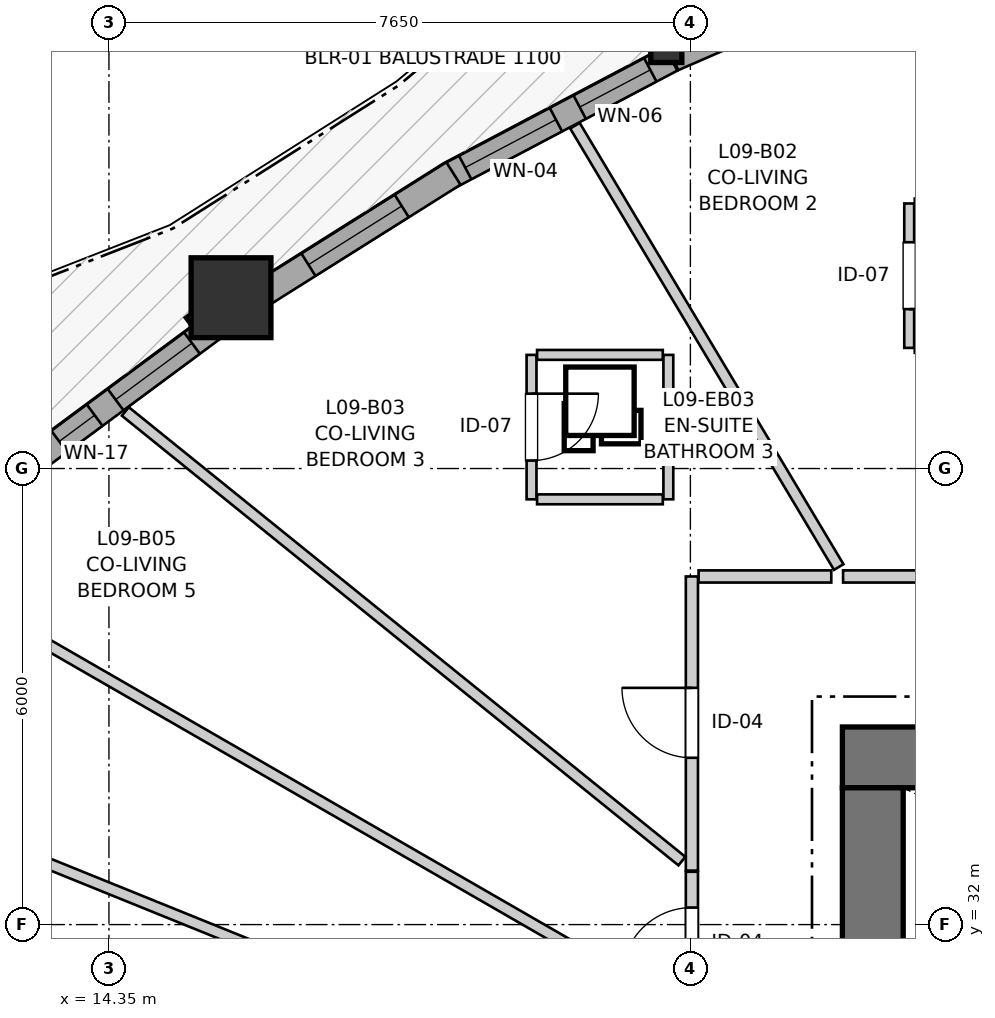
"""IFC4 building model, lengths in metres.
Left out: names, types, materials, properties, quantities, classifications, styles, units other than length and angle.
Written with IfcOpenShell. Run it as: python <this file> out.ifc"""

import sys

from ifc_helpers import new_model, si_unit, direction, frame, frame_2d, origin, origin_2d, place, context, subcontext, project, spatial, rectangle, i_section, extrude, source, transform, mapped, element, fill, save


model = new_model("IFC4")
c1 = context("Model", 3, precision=1e-05, world=origin(), true_north=direction((0.0, 1.0)))
c2 = subcontext(c1, "Body", "Model", "MODEL_VIEW")
j1 = project(units=[si_unit("LENGTHUNIT", "METRE"), si_unit("PLANEANGLEUNIT", "RADIAN")], contexts=[c1])
p1 = place(None, origin())
s1 = spatial("IfcSite", under=j1, at=p1, CompositionType="ELEMENT")
p2 = place(p1, origin())
s2 = spatial("IfcBuilding", under=s1, at=p2, CompositionType="ELEMENT")
p3 = place(p2, frame((0.0, 0.0, 33.4)))
s3 = spatial("IfcBuildingStorey", under=s2, at=p3, CompositionType="ELEMENT", Elevation=33.4)
p4 = place(p3, frame((36.7, 34.2, 0.0), z_axis=(0.0, 0.0, 1.0), x_axis=(-1.0, 0.0, 0.0)))
e1 = element("IfcWall", 1, at=p4, inside=s3, PredefinedType="SHEAR", context=c2, shape_type="SweptSolid", body=[
    extrude(rectangle(XDim=12.7, YDim=0.8, at=frame_2d((6.35, 0.0))), origin(), (0.0, 0.0, 1.0), 2.94),
])
p5 = place(p3, frame((24.4, 33.8, 0.0), z_axis=(0.0, 0.0, 1.0), x_axis=(0.0, -1.0, 0.0)))
e2 = element("IfcWall", 2, at=p5, inside=s3, PredefinedType="SHEAR", context=c2, shape_type="SweptSolid", body=[
    extrude(rectangle(XDim=15.6, YDim=0.8, at=frame_2d((7.8, 0.0))), origin(), (0.0, 0.0, 1.0), 2.94),
])
p6 = place(p5, frame((7.05, 0.0, 0.0)))
e3 = element("IfcOpeningElement", 3, at=p6, cuts=e2, PredefinedType="OPENING", context=c2, shape_type="SweptSolid", body=[
    extrude(rectangle(XDim=1.5, YDim=2.15, at=frame_2d((0.75, 1.075))), frame((0.0, 0.41, 0.0), z_axis=(0.0, -1.0, 0.0), x_axis=(1.0, 0.0, 0.0)), (0.0, 0.0, 1.0), 0.82),
])
p7 = place(p5, frame((3.52, 0.0, 0.0)))
e4 = element("IfcOpeningElement", 4, at=p7, cuts=e2, PredefinedType="OPENING", context=c2, shape_type="SweptSolid", body=[
    extrude(rectangle(XDim=0.86, YDim=2.05, at=frame_2d((0.43, 1.025))), frame((0.0, 0.41, 0.0), z_axis=(0.0, -1.0, 0.0), x_axis=(1.0, 0.0, 0.0)), (0.0, 0.0, 1.0), 0.82),
])
p8 = place(p5, frame((11.22, 0.0, 0.0)))
e5 = element("IfcOpeningElement", 5, at=p8, cuts=e2, PredefinedType="OPENING", context=c2, shape_type="SweptSolid", body=[
    extrude(rectangle(XDim=0.86, YDim=2.05, at=frame_2d((0.43, 1.025))), frame((0.0, 0.41, 0.0), z_axis=(0.0, -1.0, 0.0), x_axis=(1.0, 0.0, 0.0)), (0.0, 0.0, 1.0), 0.82),
])
m1 = source(origin(), c2, "Body", "SweptSolid", [
    extrude(i_section(OverallWidth=0.409, OverallDepth=0.425, WebThickness=0.03, FlangeThickness=0.048, FilletRadius=0.015, at=origin_2d()), origin(), (0.0, 0.0, 1.0), 2.94),
])
p9 = place(p3, frame((21.683, 43.554, 0.0), z_axis=(0.0, 0.0, 1.0), x_axis=(1.0, 0.0, 0.0)))
e6 = element("IfcColumn", 6, at=p9, inside=s3, PredefinedType="PILASTER", context=c2, shape_type="MappedRepresentation", body=[
    mapped(m1, transform((0.0, 0.0, 0.0), x_axis=(1.0, 0.0, 0.0), y_axis=(0.0, 1.0, 0.0), z_axis=(0.0, 0.0, 1.0), scale=1.0)),
])
m2 = source(origin(), c2, "Body", "SweptSolid", [
    extrude(rectangle(XDim=1.05, YDim=1.05, at=origin_2d()), origin(), (0.0, 0.0, 1.0), 2.94),
])
p10 = place(p3, frame((15.956, 40.247, 0.0), z_axis=(0.0, 0.0, 1.0), x_axis=(1.0, 0.0, 0.0)))
e7 = element("IfcColumn", 7, at=p10, inside=s3, PredefinedType="COLUMN", context=c2, shape_type="MappedRepresentation", body=[
    mapped(m2, transform((0.0, 0.0, 0.0), x_axis=(1.0, 0.0, 0.0), y_axis=(0.0, 1.0, 0.0), z_axis=(0.0, 0.0, 1.0), scale=1.0)),
])
p11 = place(p3, frame((24.84, 44.735, 0.0), z_axis=(0.0, 0.0, 1.0), x_axis=(-0.917090935142, -0.398678086532, 0.0)))
e8 = element("IfcWall", 8, at=p11, inside=s3, PredefinedType="SOLIDWALL", context=c2, shape_type="SweptSolid", body=[
    extrude(rectangle(XDim=3.346, YDim=0.35, at=frame_2d((1.673, 0.0))), origin(), (0.0, 0.0, 1.0), 2.42),
])
p12 = place(p11, frame((1.108, 0.0, 0.82)))
e9 = element("IfcOpeningElement", 9, at=p12, cuts=e8, PredefinedType="OPENING", context=c2, shape_type="SweptSolid", body=[
    extrude(rectangle(XDim=1.15, YDim=1.2, at=frame_2d((0.575, 0.6))), frame((0.0, 0.185, 0.0), z_axis=(0.0, -1.0, 0.0), x_axis=(1.0, 0.0, 0.0)), (0.0, 0.0, 1.0), 0.37),
])
p13 = place(p3, frame((21.747, 43.39, 0.0), z_axis=(0.0, 0.0, 1.0), x_axis=(-0.88437802144, -0.46677137358, 0.0)))
e10 = element("IfcWall", 10, at=p13, inside=s3, PredefinedType="SOLIDWALL", context=c2, shape_type="SweptSolid", body=[
    extrude(rectangle(XDim=3.327, YDim=0.35, at=frame_2d((1.664, 0.0))), origin(), (0.0, 0.0, 1.0), 2.42),
])
p14 = place(p13, frame((0.311, 0.0, 0.82)))
e11 = element("IfcOpeningElement", 11, at=p14, cuts=e10, PredefinedType="OPENING", context=c2, shape_type="SweptSolid", body=[
    extrude(rectangle(XDim=1.05, YDim=1.45, at=frame_2d((0.525, 0.725))), frame((0.0, 0.185, 0.0), z_axis=(0.0, -1.0, 0.0), x_axis=(1.0, 0.0, 0.0)), (0.0, 0.0, 1.0), 0.37),
])
p15 = place(p13, frame((1.714, 0.0, 0.82)))
e12 = element("IfcOpeningElement", 12, at=p15, cuts=e10, PredefinedType="OPENING", context=c2, shape_type="SweptSolid", body=[
    extrude(rectangle(XDim=1.35, YDim=1.45, at=frame_2d((0.675, 0.725))), frame((0.0, 0.185, 0.0), z_axis=(0.0, -1.0, 0.0), x_axis=(1.0, 0.0, 0.0)), (0.0, 0.0, 1.0), 0.37),
])
p16 = place(p3, frame((18.882, 41.882, 0.0), z_axis=(0.0, 0.0, 1.0), x_axis=(-0.846428134238, -0.53250297048, 0.0)))
e13 = element("IfcWall", 13, at=p16, inside=s3, PredefinedType="SOLIDWALL", context=c2, shape_type="SweptSolid", body=[
    extrude(rectangle(XDim=3.047, YDim=0.35, at=frame_2d((1.523, 0.0))), origin(), (0.0, 0.0, 1.0), 2.42),
])
p17 = place(p16, frame((0.803, 0.0, 0.82)))
e14 = element("IfcOpeningElement", 14, at=p17, cuts=e13, PredefinedType="OPENING", context=c2, shape_type="SweptSolid", body=[
    extrude(rectangle(XDim=1.45, YDim=1.25, at=frame_2d((0.725, 0.625))), frame((0.0, 0.185, 0.0), z_axis=(0.0, -1.0, 0.0), x_axis=(1.0, 0.0, 0.0)), (0.0, 0.0, 1.0), 0.37),
])
p18 = place(p3, frame((15.819, 39.928, 0.0), z_axis=(0.0, 0.0, 1.0), x_axis=(-0.803825144674, -0.594865645999, 0.0)))
e15 = element("IfcWall", 15, at=p18, inside=s3, PredefinedType="SOLIDWALL", context=c2, shape_type="SweptSolid", body=[
    extrude(rectangle(XDim=3.066, YDim=0.35, at=frame_2d((1.533, 0.0))), origin(), (0.0, 0.0, 1.0), 2.42),
])
p19 = place(p18, frame((0.469, 0.0, 0.82)))
e16 = element("IfcOpeningElement", 16, at=p19, cuts=e15, PredefinedType="OPENING", context=c2, shape_type="SweptSolid", body=[
    extrude(rectangle(XDim=1.25, YDim=1.35, at=frame_2d((0.625, 0.675))), frame((0.0, 0.185, 0.0), z_axis=(0.0, -1.0, 0.0), x_axis=(1.0, 0.0, 0.0)), (0.0, 0.0, 1.0), 0.37),
])
p20 = place(p18, frame((2.062, 0.0, 0.82)))
e17 = element("IfcOpeningElement", 17, at=p20, cuts=e15, PredefinedType="OPENING", context=c2, shape_type="SweptSolid", body=[
    extrude(rectangle(XDim=0.58, YDim=1.35, at=frame_2d((0.29, 0.675))), frame((0.0, 0.185, 0.0), z_axis=(0.0, -1.0, 0.0), x_axis=(1.0, 0.0, 0.0)), (0.0, 0.0, 1.0), 0.37),
])
p21 = place(p3, frame((22.02, 32.71, 0.0), z_axis=(0.0, 0.0, 1.0), x_axis=(0.0, 1.0, 0.0)))
e18 = element("IfcWall", 18, at=p21, inside=s3, PredefinedType="PARTITIONING", context=c2, shape_type="SweptSolid", body=[
    extrude(rectangle(XDim=3.87, YDim=0.16, at=frame_2d((1.935, 0.0))), origin(), (0.0, 0.0, 1.0), 2.94),
])
p22 = place(p21, frame((1.485, 0.0, 0.0)))
e19 = element("IfcOpeningElement", 19, at=p22, cuts=e18, PredefinedType="OPENING", context=c2, shape_type="SweptSolid", body=[
    extrude(rectangle(XDim=0.92, YDim=2.1, at=frame_2d((0.46, 1.05))), frame((0.0, 0.09, 0.0), z_axis=(0.0, -1.0, 0.0), x_axis=(1.0, 0.0, 0.0)), (0.0, 0.0, 1.0), 0.18),
])
p23 = place(p3, frame((24.009, 36.58, 0.0), z_axis=(0.0, 0.0, 1.0), x_axis=(1.0, 0.0, 0.0)))
e20 = element("IfcWall", 20, at=p23, inside=s3, PredefinedType="PARTITIONING", context=c2, shape_type="SweptSolid", body=[
    extrude(rectangle(XDim=3.822, YDim=0.16, at=frame_2d((1.911, 0.0))), origin(), (0.0, 0.0, 1.0), 2.548),
])
p24 = place(p23, frame((1.452, 0.0, 0.0)))
e21 = element("IfcOpeningElement", 21, at=p24, cuts=e20, PredefinedType="OPENING", context=c2, shape_type="SweptSolid", body=[
    extrude(rectangle(XDim=0.92, YDim=2.1, at=frame_2d((0.46, 1.05))), frame((0.0, 0.09, 0.0), z_axis=(0.0, -1.0, 0.0), x_axis=(1.0, 0.0, 0.0)), (0.0, 0.0, 1.0), 0.18),
])
p25 = place(p3, frame((22.02, 30.782, 0.0), z_axis=(0.0, 0.0, 1.0), x_axis=(0.0, 1.0, 0.0)))
e22 = element("IfcWall", 22, at=p25, inside=s3, PredefinedType="PARTITIONING", context=c2, shape_type="SweptSolid", body=[
    extrude(rectangle(XDim=1.913, YDim=0.16, at=frame_2d((0.957, 0.0))), origin(), (0.0, 0.0, 1.0), 2.94),
])
p26 = place(p25, frame((0.522, 0.0, 0.0)))
e23 = element("IfcOpeningElement", 23, at=p26, cuts=e22, PredefinedType="OPENING", context=c2, shape_type="SweptSolid", body=[
    extrude(rectangle(XDim=0.92, YDim=2.1, at=frame_2d((0.46, 1.05))), frame((0.0, 0.09, 0.0), z_axis=(0.0, -1.0, 0.0), x_axis=(1.0, 0.0, 0.0)), (0.0, 0.0, 1.0), 0.18),
])
p27 = place(p3, frame((24.879, 41.487, 0.0), z_axis=(0.0, 0.0, 1.0), x_axis=(0.0, -1.0, 0.0)))
e24 = element("IfcWall", 24, at=p27, inside=s3, PredefinedType="PARTITIONING", context=c2, shape_type="SweptSolid", body=[
    extrude(rectangle(XDim=1.9, YDim=0.13, at=frame_2d((0.95, 0.0))), origin(), (0.0, 0.0, 1.0), 2.94),
])
p28 = place(p27, frame((0.51, 0.0, 0.0)))
e25 = element("IfcOpeningElement", 25, at=p28, cuts=e24, PredefinedType="OPENING", context=c2, shape_type="SweptSolid", body=[
    extrude(rectangle(XDim=0.88, YDim=2.05, at=frame_2d((0.44, 1.025))), frame((0.0, 0.075, 0.0), z_axis=(0.0, -1.0, 0.0), x_axis=(1.0, 0.0, 0.0)), (0.0, 0.0, 1.0), 0.15),
])
p29 = place(p3, frame((19.91, 39.495, 0.0), z_axis=(0.0, 0.0, 1.0), x_axis=(0.0, -1.0, 0.0)))
e26 = element("IfcWall", 26, at=p29, inside=s3, PredefinedType="PARTITIONING", context=c2, shape_type="SweptSolid", body=[
    extrude(rectangle(XDim=1.9, YDim=0.13, at=frame_2d((0.95, 0.0))), origin(), (0.0, 0.0, 1.0), 2.94),
])
p30 = place(p29, frame((0.51, 0.0, 0.0)))
e27 = element("IfcOpeningElement", 27, at=p30, cuts=e26, PredefinedType="OPENING", context=c2, shape_type="SweptSolid", body=[
    extrude(rectangle(XDim=0.88, YDim=2.05, at=frame_2d((0.44, 1.025))), frame((0.0, 0.075, 0.0), z_axis=(0.0, -1.0, 0.0), x_axis=(1.0, 0.0, 0.0)), (0.0, 0.0, 1.0), 0.15),
])
p31 = place(p3, frame((9.577, 34.41, 0.0), z_axis=(0.0, 0.0, 1.0), x_axis=(0.926920362809, -0.375258099194, 0.0)))
e28 = element("IfcWall", 28, at=p31, inside=s3, PredefinedType="PARTITIONING", context=c2, shape_type="SweptSolid", body=[
    extrude(rectangle(XDim=13.3, YDim=0.145, at=frame_2d((6.65, 0.0))), origin(), (0.0, 0.0, 1.0), 2.94),
])
p32 = place(p3, frame((11.92, 36.618, 0.0), z_axis=(0.0, 0.0, 1.0), x_axis=(0.866473494239, -0.499223080177, 0.0)))
e29 = element("IfcWall", 29, at=p32, inside=s3, PredefinedType="PARTITIONING", context=c2, shape_type="SweptSolid", body=[
    extrude(rectangle(XDim=11.514, YDim=0.145, at=frame_2d((5.757, 0.0))), origin(), (0.0, 0.0, 1.0), 2.94),
])
p33 = place(p3, frame((14.566, 38.751, 0.0), z_axis=(0.0, 0.0, 1.0), x_axis=(0.777881688073, -0.628410756879, 0.0)))
e30 = element("IfcWall", 30, at=p33, inside=s3, PredefinedType="PARTITIONING", context=c2, shape_type="SweptSolid", body=[
    extrude(rectangle(XDim=9.413, YDim=0.145, at=frame_2d((4.707, 0.0))), origin(), (0.0, 0.0, 1.0), 2.94),
])
p34 = place(p3, frame((20.481, 42.51, 0.0), z_axis=(0.0, 0.0, 1.0), x_axis=(0.513067331262, -0.858348363773, 0.0)))
e31 = element("IfcWall", 31, at=p34, inside=s3, PredefinedType="PARTITIONING", context=c2, shape_type="SweptSolid", body=[
    extrude(rectangle(XDim=6.765, YDim=0.145, at=frame_2d((3.382, 0.0))), origin(), (0.0, 0.0, 1.0), 2.94),
])
p35 = place(p3, frame((22.108, 36.58, 0.0), z_axis=(0.0, 0.0, 1.0), x_axis=(1.0, 0.0, 0.0)))
e32 = element("IfcWall", 32, at=p35, inside=s3, PredefinedType="PARTITIONING", context=c2, shape_type="SweptSolid", body=[
    extrude(rectangle(XDim=1.746, YDim=0.16, at=frame_2d((0.873, 0.0))), origin(), (0.0, 0.0, 1.0), 2.548),
])
p36 = place(p3, frame((21.71, 37.595, 0.0), z_axis=(0.0, 0.0, 1.0), x_axis=(0.0, 1.0, 0.0)))
e33 = element("IfcWall", 33, at=p36, inside=s3, PredefinedType="PARTITIONING", context=c2, shape_type="SweptSolid", body=[
    extrude(rectangle(XDim=1.9, YDim=0.13, at=frame_2d((0.95, 0.0))), origin(), (0.0, 0.0, 1.0), 2.94),
])
for number, where, z_axis, x_axis in (
    (34, (19.983, 39.495, 0.0), (0.0, 0.0, 1.0), (1.0, 0.0, 0.0)),
    (35, (19.983, 37.595, 0.0), (0.0, 0.0, 1.0), (1.0, 0.0, 0.0)),
):
    element("IfcWall", number, at=place(p3, frame(where, z_axis=z_axis, x_axis=x_axis)), inside=s3, PredefinedType="PARTITIONING", context=c2, shape_type="SweptSolid", body=[
        extrude(rectangle(XDim=1.654, YDim=0.13, at=frame_2d((0.827, 0.0))), origin(), (0.0, 0.0, 1.0), 2.94),
    ])
p37 = place(p3, frame((24.952, 39.587, 0.0), z_axis=(0.0, 0.0, 1.0), x_axis=(1.0, 0.0, 0.0)))
e36 = element("IfcWall", 36, at=p37, inside=s3, PredefinedType="PARTITIONING", context=c2, shape_type="SweptSolid", body=[
    extrude(rectangle(XDim=1.727, YDim=0.13, at=frame_2d((0.864, 0.0))), origin(), (0.0, 0.0, 1.0), 2.94),
])
p38 = place(p3, frame((24.952, 41.487, 0.0), z_axis=(0.0, 0.0, 1.0), x_axis=(1.0, 0.0, 0.0)))
e37 = element("IfcWall", 37, at=p38, inside=s3, PredefinedType="PARTITIONING", context=c2, shape_type="SweptSolid", body=[
    extrude(rectangle(XDim=1.59, YDim=0.13, at=frame_2d((0.795, 0.0))), origin(), (0.0, 0.0, 1.0), 2.508),
])
m3 = source(origin(), c2, "Body", "SweptSolid", [
    extrude(rectangle(XDim=1.05, YDim=1.45, at=frame_2d((0.525, 0.725))), frame((0.0, 0.03, 0.0), z_axis=(0.0, -1.0, 0.0), x_axis=(1.0, 0.0, 0.0)), (0.0, 0.0, 1.0), 0.06),
])
p39 = place(p14, origin())
e38 = element("IfcWindow", 38, at=p39, inside=s3, PartitioningType="SINGLE_PANEL", PredefinedType="WINDOW", context=c2, shape_type="MappedRepresentation", body=[
    mapped(m3, transform((0.0, 0.0, 0.0), x_axis=(1.0, 0.0, 0.0), y_axis=(0.0, 1.0, 0.0), z_axis=(0.0, 0.0, 1.0), scale=1.0)),
])
fill(e11, e38)
m4 = source(origin(), c2, "Body", "SweptSolid", [
    extrude(rectangle(XDim=1.35, YDim=1.45, at=frame_2d((0.675, 0.725))), frame((0.0, 0.03, 0.0), z_axis=(0.0, -1.0, 0.0), x_axis=(1.0, 0.0, 0.0)), (0.0, 0.0, 1.0), 0.06),
])
p40 = place(p15, origin())
e39 = element("IfcWindow", 39, at=p40, inside=s3, PartitioningType="SINGLE_PANEL", PredefinedType="WINDOW", context=c2, shape_type="MappedRepresentation", body=[
    mapped(m4, transform((0.0, 0.0, 0.0), x_axis=(1.0, 0.0, 0.0), y_axis=(0.0, 1.0, 0.0), z_axis=(0.0, 0.0, 1.0), scale=1.0)),
])
fill(e12, e39)
m5 = source(origin(), c2, "Body", "SweptSolid", [
    extrude(rectangle(XDim=1.45, YDim=1.25, at=frame_2d((0.725, 0.625))), frame((0.0, 0.03, 0.0), z_axis=(0.0, -1.0, 0.0), x_axis=(1.0, 0.0, 0.0)), (0.0, 0.0, 1.0), 0.06),
])
p41 = place(p17, origin())
e40 = element("IfcWindow", 40, at=p41, inside=s3, PartitioningType="SINGLE_PANEL", PredefinedType="WINDOW", context=c2, shape_type="MappedRepresentation", body=[
    mapped(m5, transform((0.0, 0.0, 0.0), x_axis=(1.0, 0.0, 0.0), y_axis=(0.0, 1.0, 0.0), z_axis=(0.0, 0.0, 1.0), scale=1.0)),
])
fill(e14, e40)
m6 = source(origin(), c2, "Body", "SweptSolid", [
    extrude(rectangle(XDim=1.25, YDim=1.35, at=frame_2d((0.625, 0.675))), frame((0.0, 0.03, 0.0), z_axis=(0.0, -1.0, 0.0), x_axis=(1.0, 0.0, 0.0)), (0.0, 0.0, 1.0), 0.06),
])
p42 = place(p19, origin())
e41 = element("IfcWindow", 41, at=p42, inside=s3, PartitioningType="SINGLE_PANEL", PredefinedType="WINDOW", context=c2, shape_type="MappedRepresentation", body=[
    mapped(m6, transform((0.0, 0.0, 0.0), x_axis=(1.0, 0.0, 0.0), y_axis=(0.0, 1.0, 0.0), z_axis=(0.0, 0.0, 1.0), scale=1.0)),
])
fill(e16, e41)
m7 = source(origin(), c2, "Body", "SweptSolid", [
    extrude(rectangle(XDim=0.58, YDim=1.35, at=frame_2d((0.29, 0.675))), frame((0.0, 0.03, 0.0), z_axis=(0.0, -1.0, 0.0), x_axis=(1.0, 0.0, 0.0)), (0.0, 0.0, 1.0), 0.06),
])
p43 = place(p20, origin())
e42 = element("IfcWindow", 42, at=p43, inside=s3, PartitioningType="SINGLE_PANEL", PredefinedType="WINDOW", context=c2, shape_type="MappedRepresentation", body=[
    mapped(m7, transform((0.0, 0.0, 0.0), x_axis=(1.0, 0.0, 0.0), y_axis=(0.0, 1.0, 0.0), z_axis=(0.0, 0.0, 1.0), scale=1.0)),
])
fill(e17, e42)
m8 = source(origin(), c2, "Body", "SweptSolid", [
    extrude(rectangle(XDim=0.92, YDim=2.1, at=frame_2d((0.46, 1.05))), frame((0.0, 0.025, 0.0), z_axis=(0.0, -1.0, 0.0), x_axis=(1.0, 0.0, 0.0)), (0.0, 0.0, 1.0), 0.05),
])
p44 = place(p22, origin())
e43 = element("IfcDoor", 43, at=p44, inside=s3, OperationType="SINGLE_SWING_RIGHT", PredefinedType="DOOR", context=c2, shape_type="MappedRepresentation", body=[
    mapped(m8, transform((0.0, 0.0, 0.0), x_axis=(1.0, 0.0, 0.0), y_axis=(0.0, 1.0, 0.0), z_axis=(0.0, 0.0, 1.0), scale=1.0)),
])
fill(e19, e43)
p45 = place(p26, origin())
e44 = element("IfcDoor", 44, at=p45, inside=s3, OperationType="SINGLE_SWING_LEFT", PredefinedType="DOOR", context=c2, shape_type="MappedRepresentation", body=[
    mapped(m8, transform((0.0, 0.0, 0.0), x_axis=(1.0, 0.0, 0.0), y_axis=(0.0, 1.0, 0.0), z_axis=(0.0, 0.0, 1.0), scale=1.0)),
])
fill(e23, e44)
m9 = source(origin(), c2, "Body", "SweptSolid", [
    extrude(rectangle(XDim=0.88, YDim=2.05, at=frame_2d((0.44, 1.025))), frame((0.0, 0.025, 0.0), z_axis=(0.0, -1.0, 0.0), x_axis=(1.0, 0.0, 0.0)), (0.0, 0.0, 1.0), 0.05),
])
p46 = place(p28, origin())
e45 = element("IfcDoor", 45, at=p46, inside=s3, OperationType="SINGLE_SWING_RIGHT", PredefinedType="DOOR", context=c2, shape_type="MappedRepresentation", body=[
    mapped(m9, transform((0.0, 0.0, 0.0), x_axis=(1.0, 0.0, 0.0), y_axis=(0.0, 1.0, 0.0), z_axis=(0.0, 0.0, 1.0), scale=1.0)),
])
fill(e25, e45)
p47 = place(p30, origin())
e46 = element("IfcDoor", 46, at=p47, inside=s3, OperationType="SINGLE_SWING_LEFT", PredefinedType="DOOR", context=c2, shape_type="MappedRepresentation", body=[
    mapped(m9, transform((0.0, 0.0, 0.0), x_axis=(1.0, 0.0, 0.0), y_axis=(0.0, 1.0, 0.0), z_axis=(0.0, 0.0, 1.0), scale=1.0)),
])
fill(e27, e46)
save(model, sys.argv[1])
